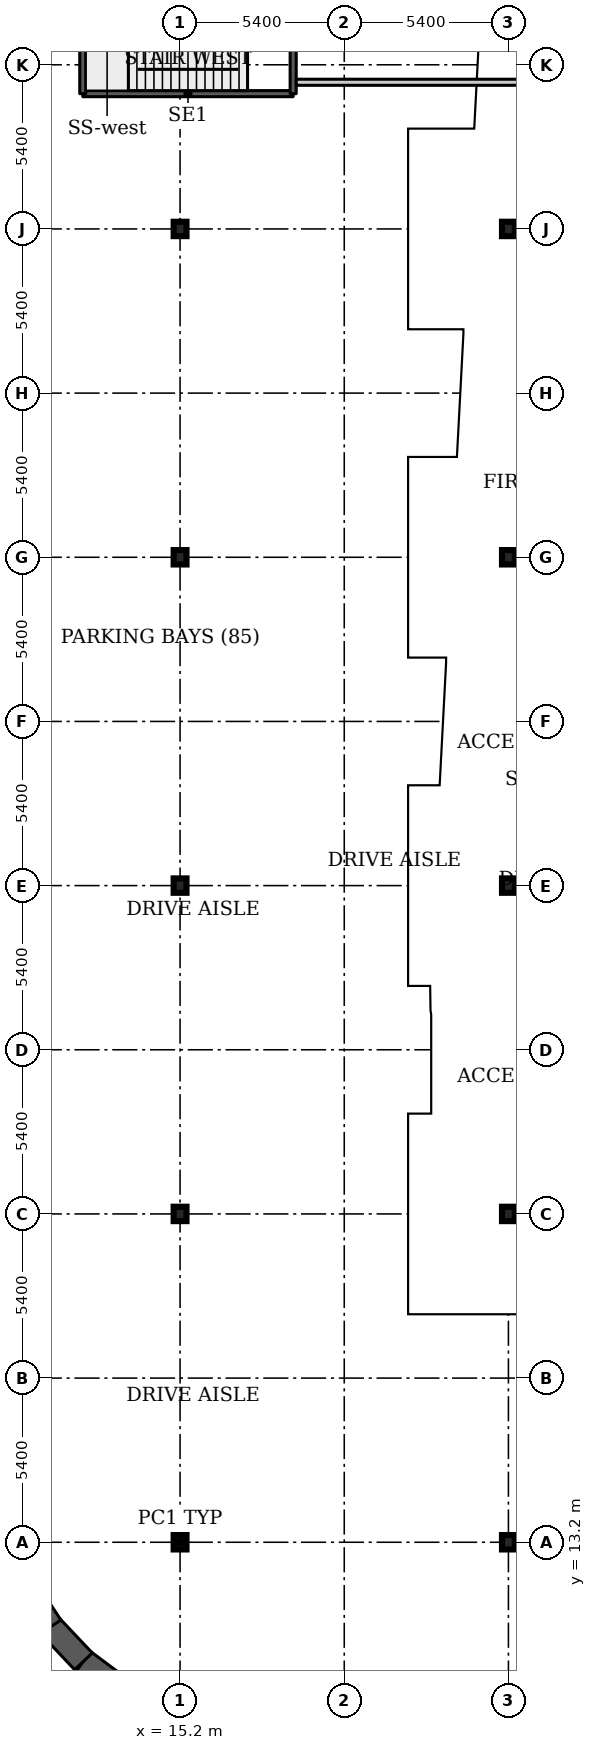
"""IFC4 building model, lengths in metres.
Left out: names, types, materials, properties, quantities, classifications, styles, units other than length and angle.
Written with IfcOpenShell. Run it as: python <this file> out.ifc"""

import sys

from ifc_helpers import new_model, si_unit, direction, frame, frame_2d, origin, origin_2d, place, context, subcontext, project, spatial, rectangle, i_section, extrude, element, save


model = new_model("IFC4")
c1 = context("Model", 3, precision=1e-05, world=origin(), true_north=direction((0.0, 1.0)))
c2 = subcontext(c1, "Body", "Model", "MODEL_VIEW")
j1 = project(units=[si_unit("LENGTHUNIT", "METRE"), si_unit("PLANEANGLEUNIT", "RADIAN")], contexts=[c1])
p1 = place(None, origin())
s1 = spatial("IfcSite", under=j1, at=p1, CompositionType="ELEMENT")
p2 = place(p1, origin())
s2 = spatial("IfcBuilding", under=s1, at=p2, CompositionType="ELEMENT")
p3 = place(p2, frame((0.0, 0.0, -15.0)))
s3 = spatial("IfcBuildingStorey", under=s2, at=p3, CompositionType="ELEMENT", Elevation=-15.0)
for number, where, z_axis, x_axis in (
    (1, (15.2, 13.2, 0.0), (0.0, 0.0, 1.0), (1.0, 0.0, 0.0)),
    (2, (26.0, 13.2, 0.0), (0.0, 0.0, 1.0), (1.0, 0.0, 0.0)),
    (3, (15.2, 24.0, 0.0), (0.0, 0.0, 1.0), (1.0, 0.0, 0.0)),
    (4, (26.0, 24.0, 0.0), (0.0, 0.0, 1.0), (1.0, 0.0, 0.0)),
    (5, (15.2, 34.8, 0.0), (0.0, 0.0, 1.0), (1.0, 0.0, 0.0)),
    (6, (26.0, 34.8, 0.0), (0.0, 0.0, 1.0), (1.0, 0.0, 0.0)),
    (7, (15.2, 45.6, 0.0), (0.0, 0.0, 1.0), (1.0, 0.0, 0.0)),
    (8, (26.0, 45.6, 0.0), (0.0, 0.0, 1.0), (1.0, 0.0, 0.0)),
    (9, (15.2, 56.4, 0.0), (0.0, 0.0, 1.0), (1.0, 0.0, 0.0)),
    (10, (26.0, 56.4, 0.0), (0.0, 0.0, 1.0), (1.0, 0.0, 0.0)),
):
    element("IfcColumn", number, at=place(p3, frame(where, z_axis=z_axis, x_axis=x_axis)), inside=s3, PredefinedType="COLUMN", context=c2, shape_type="SweptSolid", body=[
        extrude(i_section(OverallWidth=0.424, OverallDepth=0.474, WebThickness=0.048, FlangeThickness=0.077, FilletRadius=0.014, at=origin_2d()), origin(), (0.0, 0.0, 1.0), 5.0),
    ])
p4 = place(p3, frame((13.279, 8.346, 0.0), z_axis=(0.0, 0.0, 1.0), x_axis=(-0.801771638905, 0.597630520512, 0.0)))
e11 = element("IfcWall", 11, at=p4, inside=s3, PredefinedType="SOLIDWALL", context=c2, shape_type="SweptSolid", body=[
    extrude(rectangle(XDim=1.568, YDim=0.8, at=frame_2d((0.784, 0.0))), origin(), (0.0, 0.0, 1.0), 5.0),
])
p5 = place(p3, frame((12.022, 9.283, 0.0), z_axis=(0.0, 0.0, 1.0), x_axis=(-0.686641833089, 0.726995868662, 0.0)))
e12 = element("IfcWall", 12, at=p5, inside=s3, PredefinedType="SOLIDWALL", context=c2, shape_type="SweptSolid", body=[
    extrude(rectangle(XDim=1.567, YDim=0.8, at=frame_2d((0.783, 0.0))), origin(), (0.0, 0.0, 1.0), 5.0),
])
p6 = place(p3, frame((10.946, 10.422, 0.0), z_axis=(0.0, 0.0, 1.0), x_axis=(-0.549333272834, 0.835603348101, 0.0)))
e13 = element("IfcWall", 13, at=p6, inside=s3, PredefinedType="SOLIDWALL", context=c2, shape_type="SweptSolid", body=[
    extrude(rectangle(XDim=1.568, YDim=0.8, at=frame_2d((0.784, 0.0))), origin(), (0.0, 0.0, 1.0), 5.0),
])
p7 = place(p3, frame((12.0, 60.85, 0.0), z_axis=(0.0, 0.0, 1.0), x_axis=(1.0, 0.0, 0.0)))
e14 = element("IfcWall", 14, at=p7, inside=s3, PredefinedType="SHEAR", context=c2, shape_type="SweptSolid", body=[
    extrude(rectangle(XDim=6.92, YDim=0.2, at=frame_2d((3.46, 0.0))), origin(), (0.0, 0.0, 1.0), 5.0),
])
p8 = place(p3, frame((12.0, 60.85, 0.0), z_axis=(0.0, 0.0, 1.0), x_axis=(0.0, 1.0, 0.0)))
e15 = element("IfcWall", 15, at=p8, inside=s3, PredefinedType="SHEAR", context=c2, shape_type="SweptSolid", body=[
    extrude(rectangle(XDim=3.15, YDim=0.2, at=frame_2d((1.575, 0.0))), origin(), (0.0, 0.0, 1.0), 5.0),
])
p9 = place(p3, frame((18.92, 60.85, 0.0), z_axis=(0.0, 0.0, 1.0), x_axis=(0.0, 1.0, 0.0)))
e16 = element("IfcWall", 16, at=p9, inside=s3, PredefinedType="SHEAR", context=c2, shape_type="SweptSolid", body=[
    extrude(rectangle(XDim=3.15, YDim=0.2, at=frame_2d((1.575, 0.0))), origin(), (0.0, 0.0, 1.0), 5.0),
])
p10 = place(p9, frame((1.425, 0.0, 0.0)))
e17 = element("IfcOpeningElement", 17, at=p10, cuts=e16, PredefinedType="OPENING", context=c2, shape_type="SweptSolid", body=[
    extrude(rectangle(XDim=1.1, YDim=2.2, at=frame_2d((0.55, 1.1))), frame((0.0, 0.11, 0.0), z_axis=(0.0, -1.0, 0.0), x_axis=(1.0, 0.0, 0.0)), (0.0, 0.0, 1.0), 0.22),
])
p11 = place(p3, frame((19.02, 61.225, 0.0), z_axis=(0.0, 0.0, 1.0), x_axis=(1.0, 0.0, 0.0)))
e18 = element("IfcWall", 18, at=p11, inside=s3, PredefinedType="PARTITIONING", context=c2, shape_type="SweptSolid", body=[
    extrude(rectangle(XDim=26.83, YDim=0.2, at=frame_2d((13.415, 0.0))), origin(), (0.0, 0.0, 1.0), 4.68),
])
save(model, sys.argv[1])
